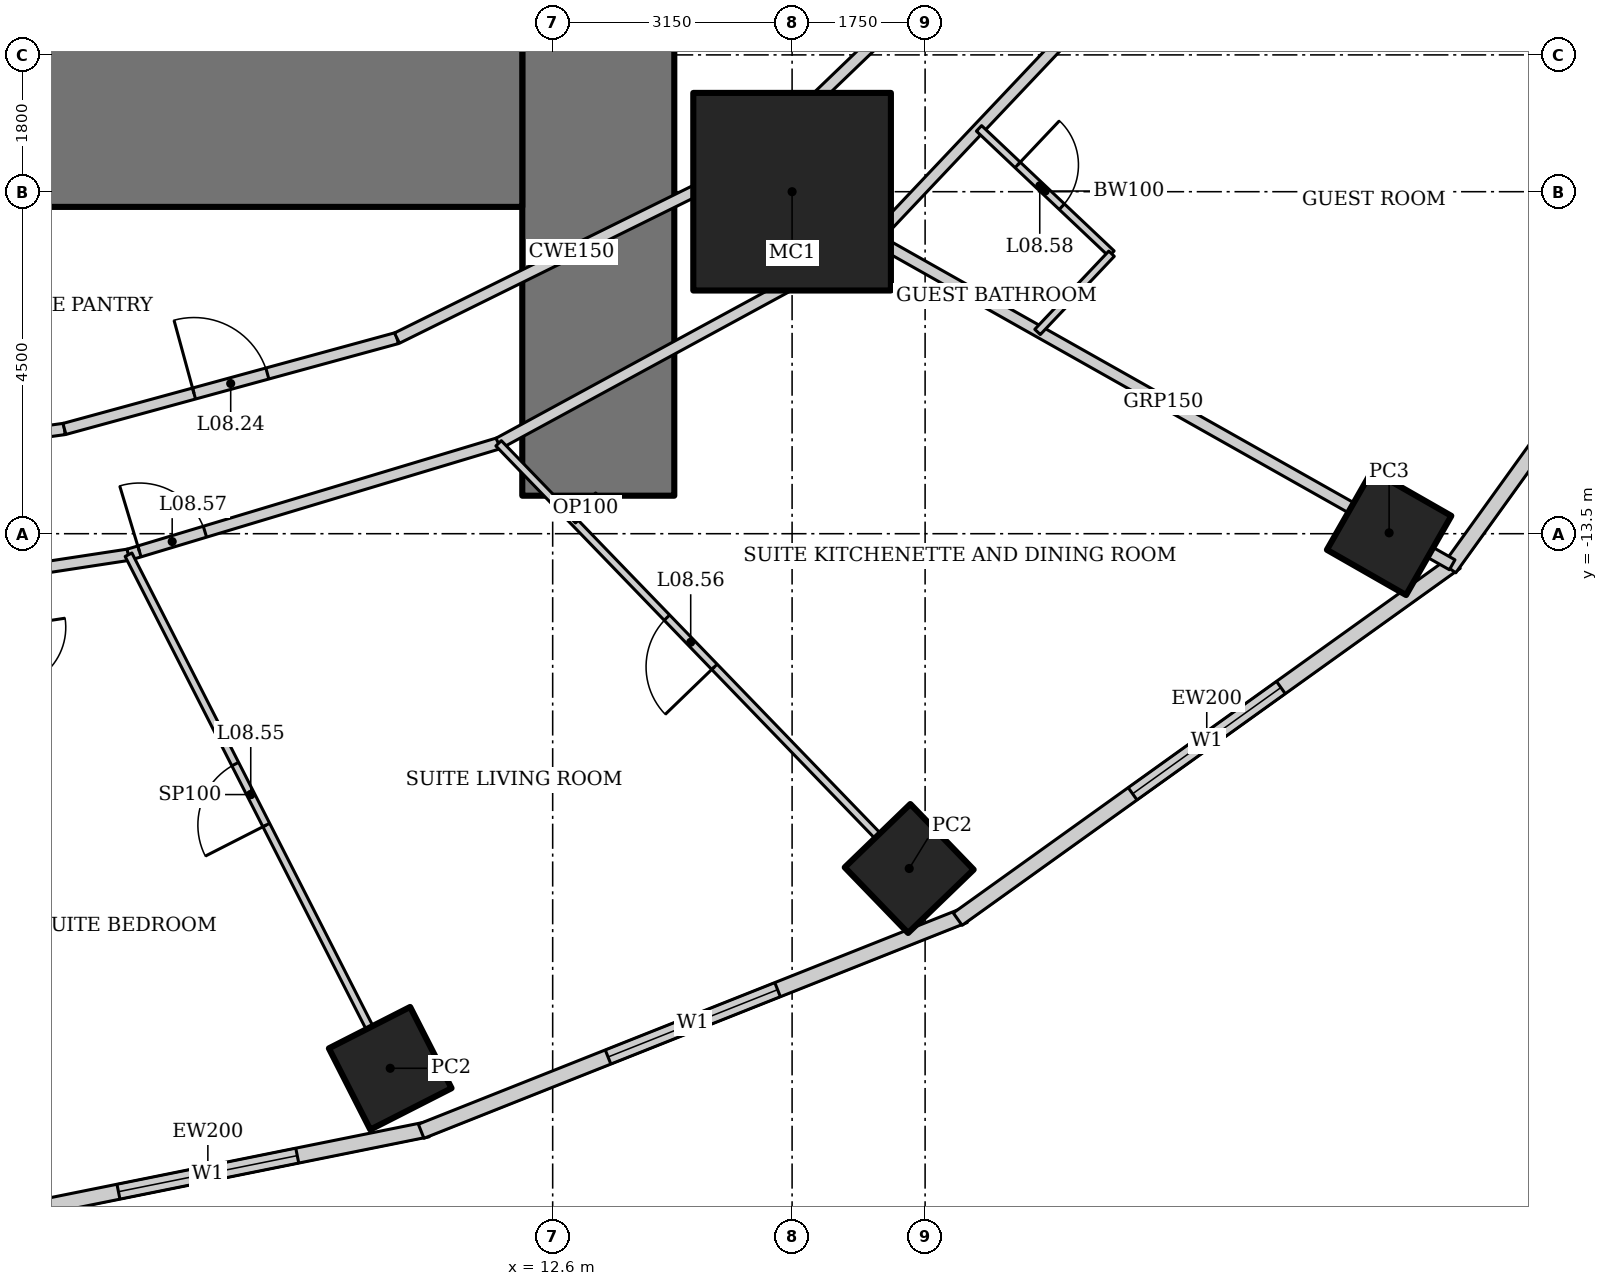
"""IFC4 building model, lengths in metres.
Left out: names, types, materials, properties, quantities, classifications, styles, units other than length and angle.
Written with IfcOpenShell. Run it as: python <this file> out.ifc"""

import sys

from ifc_helpers import new_model, si_unit, direction, frame, frame_2d, origin, origin_2d, place, context, subcontext, project, spatial, rectangle, hollow_rectangle, extrude, element, fill, save


model = new_model("IFC4")
c1 = context("Model", 3, precision=1e-05, world=origin(), true_north=direction((0.0, 1.0)))
c2 = subcontext(c1, "Body", "Model", "MODEL_VIEW")
j1 = project(units=[si_unit("LENGTHUNIT", "METRE"), si_unit("PLANEANGLEUNIT", "RADIAN")], contexts=[c1])
p1 = place(None, origin())
s1 = spatial("IfcSite", under=j1, at=p1, CompositionType="ELEMENT")
p2 = place(p1, origin())
s2 = spatial("IfcBuilding", under=s1, at=p2, CompositionType="ELEMENT")
p3 = place(p2, frame((0.0, 0.0, 44.2)))
s3 = spatial("IfcBuildingStorey", under=s2, at=p3, CompositionType="ELEMENT", Elevation=44.2)
p4 = place(p3, frame((15.75, -9.0, 0.0), z_axis=(0.0, 0.0, 1.0), x_axis=(1.0, 0.0, 0.0)))
e1 = element("IfcColumn", 1, at=p4, inside=s3, PredefinedType="COLUMN", context=c2, shape_type="SweptSolid", body=[
    extrude(hollow_rectangle(XDim=2.6, YDim=2.6, WallThickness=0.13, at=origin_2d()), origin(), (0.0, 0.0, 1.0), 3.6),
])
for number, where, z_axis, x_axis in (
    (2, (10.463, -20.534, 0.0), (0.0, 0.0, 1.0), (0.891, 0.454, 0.0)),
    (3, (17.291, -17.905, 0.0), (0.0, 0.0, 1.0), (0.719, 0.695, 0.0)),
):
    element("IfcColumn", number, at=place(p3, frame(where, z_axis=z_axis, x_axis=x_axis)), inside=s3, PredefinedType="COLUMN", context=c2, shape_type="SweptSolid", body=[
        extrude(hollow_rectangle(XDim=1.2, YDim=1.2, WallThickness=0.1, at=origin_2d()), origin(), (0.0, 0.0, 1.0), 3.6),
    ])
p5 = place(p3, frame((23.605, -13.489, 0.0), z_axis=(0.0, 0.0, 1.0), x_axis=(0.496139221777, 0.86824298017, 0.0)))
e4 = element("IfcColumn", 4, at=p5, inside=s3, PredefinedType="COLUMN", context=c2, shape_type="SweptSolid", body=[
    extrude(hollow_rectangle(XDim=1.2, YDim=1.2, WallThickness=0.12, at=origin_2d()), origin(), (0.0, 0.0, 1.0), 3.6),
])
p6 = place(p3, frame((13.2, -13.0, 0.0), z_axis=(0.0, 0.0, 1.0), x_axis=(0.0, 1.0, 0.0)))
e5 = element("IfcWall", 5, at=p6, inside=s3, PredefinedType="SHEAR", context=c2, shape_type="SweptSolid", body=[
    extrude(rectangle(XDim=26.0, YDim=2.0, at=frame_2d((13.0, 0.0))), origin(), (0.0, 0.0, 1.0), 3.6),
])
p7 = place(p6, frame((12.1, 0.0, 0.0)))
e6 = element("IfcOpeningElement", 6, at=p7, cuts=e5, PredefinedType="OPENING", context=c2, shape_type="SweptSolid", body=[
    extrude(rectangle(XDim=1.8, YDim=2.1, at=frame_2d((0.9, 1.05))), frame((0.0, 1.01, 0.0), z_axis=(0.0, -1.0, 0.0), x_axis=(1.0, 0.0, 0.0)), (0.0, 0.0, 1.0), 2.02),
])
p8 = place(p3, frame((-12.2, -8.0, 0.0), z_axis=(0.0, 0.0, 1.0), x_axis=(1.0, 0.0, 0.0)))
e7 = element("IfcWall", 7, at=p8, inside=s3, PredefinedType="SHEAR", context=c2, shape_type="SweptSolid", body=[
    extrude(rectangle(XDim=24.4, YDim=2.4, at=frame_2d((12.2, 0.0))), origin(), (0.0, 0.0, 1.0), 3.6),
])
p9 = place(p3, frame((5.17, -22.504, 0.0), z_axis=(0.0, 0.0, 1.0), x_axis=(0.980251657452, 0.197754110105, 0.0)))
e8 = element("IfcWall", 8, at=p9, inside=s3, PredefinedType="SOLIDWALL", context=c2, shape_type="SweptSolid", body=[
    extrude(rectangle(XDim=5.904, YDim=0.2, at=frame_2d((2.952, 0.0))), origin(), (0.0, 0.0, 1.0), 3.45),
])
p10 = place(p9, frame((1.752, 0.0, 0.5)))
e9 = element("IfcOpeningElement", 9, at=p10, cuts=e8, PredefinedType="OPENING", context=c2, shape_type="SweptSolid", body=[
    extrude(rectangle(XDim=2.4, YDim=2.2, at=frame_2d((1.2, 1.1))), frame((0.0, 0.11, 0.0), z_axis=(0.0, -1.0, 0.0), x_axis=(1.0, 0.0, 0.0)), (0.0, 0.0, 1.0), 0.22),
])
p11 = place(p3, frame((10.869, -21.363, 0.0), z_axis=(0.0, 0.0, 1.0), x_axis=(0.929358351251, 0.369178892895, 0.0)))
e10 = element("IfcWall", 10, at=p11, inside=s3, PredefinedType="SOLIDWALL", context=c2, shape_type="SweptSolid", body=[
    extrude(rectangle(XDim=7.692, YDim=0.2, at=frame_2d((3.846, 0.0))), origin(), (0.0, 0.0, 1.0), 3.45),
])
p12 = place(p11, frame((2.646, 0.0, 0.5)))
e11 = element("IfcOpeningElement", 11, at=p12, cuts=e10, PredefinedType="OPENING", context=c2, shape_type="SweptSolid", body=[
    extrude(rectangle(XDim=2.4, YDim=2.2, at=frame_2d((1.2, 1.1))), frame((0.0, 0.11, 0.0), z_axis=(0.0, -1.0, 0.0), x_axis=(1.0, 0.0, 0.0)), (0.0, 0.0, 1.0), 0.22),
])
p13 = place(p3, frame((17.929, -18.572, 0.0), z_axis=(0.0, 0.0, 1.0), x_axis=(0.812791321576, 0.582554948112, 0.0)))
e12 = element("IfcWall", 12, at=p13, inside=s3, PredefinedType="SOLIDWALL", context=c2, shape_type="SweptSolid", body=[
    extrude(rectangle(XDim=8.063, YDim=0.2, at=frame_2d((4.032, 0.0))), origin(), (0.0, 0.0, 1.0), 3.45),
])
p14 = place(p13, frame((2.832, 0.0, 0.5)))
e13 = element("IfcOpeningElement", 13, at=p14, cuts=e12, PredefinedType="OPENING", context=c2, shape_type="SweptSolid", body=[
    extrude(rectangle(XDim=2.4, YDim=2.2, at=frame_2d((1.2, 1.1))), frame((0.0, 0.11, 0.0), z_axis=(0.0, -1.0, 0.0), x_axis=(1.0, 0.0, 0.0)), (0.0, 0.0, 1.0), 0.22),
])
p15 = place(p3, frame((24.4, -13.957, 0.0), z_axis=(0.0, 0.0, 1.0), x_axis=(0.583937613703, 0.811798536155, 0.0)))
e14 = element("IfcWall", 14, at=p15, inside=s3, PredefinedType="SOLIDWALL", context=c2, shape_type="SweptSolid", body=[
    extrude(rectangle(XDim=8.323, YDim=0.2, at=frame_2d((4.162, 0.0))), origin(), (0.0, 0.0, 1.0), 3.45),
])
p16 = place(p15, frame((2.961, 0.0, 0.5)))
e15 = element("IfcOpeningElement", 15, at=p16, cuts=e14, PredefinedType="OPENING", context=c2, shape_type="SweptSolid", body=[
    extrude(rectangle(XDim=2.4, YDim=2.2, at=frame_2d((1.2, 1.1))), frame((0.0, 0.11, 0.0), z_axis=(0.0, -1.0, 0.0), x_axis=(1.0, 0.0, 0.0)), (0.0, 0.0, 1.0), 0.22),
])
p17 = place(p3, frame((24.435, -13.909, 0.0), z_axis=(0.0, 0.0, 1.0), x_axis=(-0.87090601027, 0.491449612143, 0.0)))
e16 = element("IfcWall", 16, at=p17, inside=s3, PredefinedType="PARTITIONING", context=c2, shape_type="SweptSolid", body=[
    extrude(rectangle(XDim=8.726, YDim=0.15, at=frame_2d((4.363, 0.0))), origin(), (0.0, 0.0, 1.0), 2.693),
])
p18 = place(p3, frame((29.222, -7.254, 0.0), z_axis=(0.0, 0.0, 1.0), x_axis=(-0.971178166182, 0.238354713676, 0.0)))
e17 = element("IfcWall", 17, at=p18, inside=s3, PredefinedType="PARTITIONING", context=c2, shape_type="SweptSolid", body=[
    extrude(rectangle(XDim=8.482, YDim=0.15, at=frame_2d((4.241, 0.0))), origin(), (0.0, 0.0, 1.0), 2.333),
])
p19 = place(p3, frame((3.311, -14.342, 0.0), z_axis=(0.0, 0.0, 1.0), x_axis=(0.988564270062, 0.150800145746, 0.0)))
e18 = element("IfcWall", 18, at=p19, inside=s3, PredefinedType="PARTITIONING", context=c2, shape_type="SweptSolid", body=[
    extrude(rectangle(XDim=3.751, YDim=0.15, at=frame_2d((1.875, 0.0))), origin(), (0.0, 0.0, 1.0), 3.45),
])
p20 = place(p3, frame((7.019, -13.776, 0.0), z_axis=(0.0, 0.0, 1.0), x_axis=(0.957564241242, 0.288219922793, 0.0)))
e19 = element("IfcWall", 19, at=p20, inside=s3, PredefinedType="PARTITIONING", context=c2, shape_type="SweptSolid", body=[
    extrude(rectangle(XDim=5.085, YDim=0.15, at=frame_2d((2.542, 0.0))), origin(), (0.0, 0.0, 1.0), 3.45),
])
p21 = place(p20, frame((0.15, 0.0, 0.0)))
e20 = element("IfcOpeningElement", 20, at=p21, cuts=e19, PredefinedType="OPENING", context=c2, shape_type="SweptSolid", body=[
    extrude(rectangle(XDim=0.9, YDim=2.1, at=frame_2d((0.45, 1.05))), frame((0.0, 0.085, 0.0), z_axis=(0.0, -1.0, 0.0), x_axis=(1.0, 0.0, 0.0)), (0.0, 0.0, 1.0), 0.17),
])
p22 = place(p3, frame((11.888, -12.311, 0.0), z_axis=(0.0, 0.0, 1.0), x_axis=(0.878450059298, 0.477834169267, 0.0)))
e21 = element("IfcWall", 21, at=p22, inside=s3, PredefinedType="PARTITIONING", context=c2, shape_type="SweptSolid", body=[
    extrude(rectangle(XDim=5.631, YDim=0.15, at=frame_2d((2.815, 0.0))), origin(), (0.0, 0.0, 1.0), 3.45),
])
p23 = place(p3, frame((16.835, -9.62, 0.0), z_axis=(0.0, 0.0, 1.0), x_axis=(0.687062608696, 0.726598218916, 0.0)))
e22 = element("IfcWall", 22, at=p23, inside=s3, PredefinedType="PARTITIONING", context=c2, shape_type="SweptSolid", body=[
    extrude(rectangle(XDim=6.039, YDim=0.15, at=frame_2d((3.02, 0.0))), origin(), (0.0, 0.0, 1.0), 3.45),
])
p24 = place(p23, frame((4.989, 0.0, 0.0)))
e23 = element("IfcOpeningElement", 23, at=p24, cuts=e22, PredefinedType="OPENING", context=c2, shape_type="SweptSolid", body=[
    extrude(rectangle(XDim=0.9, YDim=2.1, at=frame_2d((0.45, 1.05))), frame((0.0, 0.085, 0.0), z_axis=(0.0, -1.0, 0.0), x_axis=(1.0, 0.0, 0.0)), (0.0, 0.0, 1.0), 0.17),
])
p25 = place(p3, frame((2.903, -12.574, 0.0), z_axis=(0.0, 0.0, 1.0), x_axis=(0.990563451353, 0.137054911782, 0.0)))
e24 = element("IfcWall", 24, at=p25, inside=s3, PredefinedType="PARTITIONING", context=c2, shape_type="SweptSolid", body=[
    extrude(rectangle(XDim=3.304, YDim=0.15, at=frame_2d((1.652, 0.0))), origin(), (0.0, 0.0, 1.0), 3.45),
])
p26 = place(p3, frame((6.176, -12.122, 0.0), z_axis=(0.0, 0.0, 1.0), x_axis=(0.964644466646, 0.263554648923, 0.0)))
e25 = element("IfcWall", 25, at=p26, inside=s3, PredefinedType="PARTITIONING", context=c2, shape_type="SweptSolid", body=[
    extrude(rectangle(XDim=4.535, YDim=0.15, at=frame_2d((2.268, 0.0))), origin(), (0.0, 0.0, 1.0), 3.45),
])
p27 = place(p26, frame((1.768, 0.0, 0.0)))
e26 = element("IfcOpeningElement", 26, at=p27, cuts=e25, PredefinedType="OPENING", context=c2, shape_type="SweptSolid", body=[
    extrude(rectangle(XDim=1.0, YDim=2.1, at=frame_2d((0.5, 1.05))), frame((0.0, 0.085, 0.0), z_axis=(0.0, -1.0, 0.0), x_axis=(1.0, 0.0, 0.0)), (0.0, 0.0, 1.0), 0.17),
])
p28 = place(p3, frame((10.551, -10.926, 0.0), z_axis=(0.0, 0.0, 1.0), x_axis=(0.89656943448, 0.442903205177, 0.0)))
e27 = element("IfcWall", 27, at=p28, inside=s3, PredefinedType="PARTITIONING", context=c2, shape_type="SweptSolid", body=[
    extrude(rectangle(XDim=5.126, YDim=0.15, at=frame_2d((2.563, 0.0))), origin(), (0.0, 0.0, 1.0), 3.45),
])
p29 = place(p3, frame((15.147, -8.656, 0.0), z_axis=(0.0, 0.0, 1.0), x_axis=(0.720837261072, 0.693104352209, 0.0)))
e28 = element("IfcWall", 28, at=p29, inside=s3, PredefinedType="PARTITIONING", context=c2, shape_type="SweptSolid", body=[
    extrude(rectangle(XDim=5.59, YDim=0.15, at=frame_2d((2.795, 0.0))), origin(), (0.0, 0.0, 1.0), 3.45),
])
p30 = place(p29, frame((2.295, 0.0, 0.0)))
e29 = element("IfcOpeningElement", 29, at=p30, cuts=e28, PredefinedType="OPENING", context=c2, shape_type="SweptSolid", body=[
    extrude(rectangle(XDim=1.0, YDim=2.1, at=frame_2d((0.5, 1.05))), frame((0.0, 0.085, 0.0), z_axis=(0.0, -1.0, 0.0), x_axis=(1.0, 0.0, 0.0)), (0.0, 0.0, 1.0), 0.17),
])
p31 = place(p3, frame((10.236, -20.088, 0.0), z_axis=(0.0, 0.0, 1.0), x_axis=(-0.454010445571, 0.890996360998, 0.0)))
e30 = element("IfcWall", 30, at=p31, inside=s3, PredefinedType="PARTITIONING", context=c2, shape_type="SweptSolid", body=[
    extrude(rectangle(XDim=7.084, YDim=0.1, at=frame_2d((3.542, 0.0))), origin(), (0.0, 0.0, 1.0), 2.528),
])
p32 = place(p31, frame((3.092, 0.0, 0.0)))
e31 = element("IfcOpeningElement", 31, at=p32, cuts=e30, PredefinedType="OPENING", context=c2, shape_type="SweptSolid", body=[
    extrude(rectangle(XDim=0.9, YDim=2.1, at=frame_2d((0.45, 1.05))), frame((0.0, 0.06, 0.0), z_axis=(0.0, -1.0, 0.0), x_axis=(1.0, 0.0, 0.0)), (0.0, 0.0, 1.0), 0.12),
])
p33 = place(p3, frame((16.944, -17.545, 0.0), z_axis=(0.0, 0.0, 1.0), x_axis=(-0.694669949151, 0.719328618746, 0.0)))
e32 = element("IfcWall", 32, at=p33, inside=s3, PredefinedType="PARTITIONING", context=c2, shape_type="SweptSolid", body=[
    extrude(rectangle(XDim=7.277, YDim=0.1, at=frame_2d((3.639, 0.0))), origin(), (0.0, 0.0, 1.0), 2.528),
])
p34 = place(p33, frame((3.189, 0.0, 0.0)))
e33 = element("IfcOpeningElement", 33, at=p34, cuts=e32, PredefinedType="OPENING", context=c2, shape_type="SweptSolid", body=[
    extrude(rectangle(XDim=0.9, YDim=2.1, at=frame_2d((0.45, 1.05))), frame((0.0, 0.06, 0.0), z_axis=(0.0, -1.0, 0.0), x_axis=(1.0, 0.0, 0.0)), (0.0, 0.0, 1.0), 0.12),
])
p35 = place(p3, frame((18.209, -8.167, 0.0), z_axis=(0.0, 0.0, 1.0), x_axis=(0.726567238928, -0.687095369885, 0.0)))
e34 = element("IfcWall", 34, at=p35, inside=s3, PredefinedType="PARTITIONING", context=c2, shape_type="SweptSolid", body=[
    extrude(rectangle(XDim=2.4, YDim=0.1, at=frame_2d((1.2, 0.0))), origin(), (0.0, 0.0, 1.0), 3.45),
])
p36 = place(p35, frame((0.7, 0.0, 0.0)))
e35 = element("IfcOpeningElement", 35, at=p36, cuts=e34, PredefinedType="OPENING", context=c2, shape_type="SweptSolid", body=[
    extrude(rectangle(XDim=0.8, YDim=2.1, at=frame_2d((0.4, 1.05))), frame((0.0, 0.06, 0.0), z_axis=(0.0, -1.0, 0.0), x_axis=(1.0, 0.0, 0.0)), (0.0, 0.0, 1.0), 0.12),
])
p37 = place(p3, frame((19.953, -9.816, 0.0), z_axis=(0.0, 0.0, 1.0), x_axis=(-0.687017997787, -0.726640399866, 0.0)))
e36 = element("IfcWall", 36, at=p37, inside=s3, PredefinedType="PARTITIONING", context=c2, shape_type="SweptSolid", body=[
    extrude(rectangle(XDim=1.417, YDim=0.1, at=frame_2d((0.708, 0.0))), origin(), (0.0, 0.0, 1.0), 3.45),
])
p38 = place(p3, frame((13.2, -13.0, 0.0), z_axis=(0.0, 0.0, 1.0), x_axis=(-0.719347134512, -0.69465077562, 0.0)))
e37 = element("IfcWall", 37, at=p38, inside=s3, PredefinedType="PARTITIONING", context=c2, shape_type="SweptSolid", body=[
    extrude(rectangle(XDim=0.465, YDim=0.1, at=frame_2d((0.232, 0.0))), origin(), (0.0, 0.0, 1.0), 3.45),
])
p39 = place(p10, origin())
e38 = element("IfcWindow", 38, at=p39, inside=s3, PartitioningType="SINGLE_PANEL", PredefinedType="WINDOW", context=c2, shape_type="SweptSolid", body=[
    extrude(rectangle(XDim=2.4, YDim=2.2, at=frame_2d((1.2, 1.1))), frame((0.0, 0.03, 0.0), z_axis=(0.0, -1.0, 0.0), x_axis=(1.0, 0.0, 0.0)), (0.0, 0.0, 1.0), 0.06),
])
fill(e9, e38)
p40 = place(p12, origin())
e39 = element("IfcWindow", 39, at=p40, inside=s3, PartitioningType="SINGLE_PANEL", PredefinedType="WINDOW", context=c2, shape_type="SweptSolid", body=[
    extrude(rectangle(XDim=2.4, YDim=2.2, at=frame_2d((1.2, 1.1))), frame((0.0, 0.03, 0.0), z_axis=(0.0, -1.0, 0.0), x_axis=(1.0, 0.0, 0.0)), (0.0, 0.0, 1.0), 0.06),
])
fill(e11, e39)
p41 = place(p14, origin())
e40 = element("IfcWindow", 40, at=p41, inside=s3, PartitioningType="SINGLE_PANEL", PredefinedType="WINDOW", context=c2, shape_type="SweptSolid", body=[
    extrude(rectangle(XDim=2.4, YDim=2.2, at=frame_2d((1.2, 1.1))), frame((0.0, 0.03, 0.0), z_axis=(0.0, -1.0, 0.0), x_axis=(1.0, 0.0, 0.0)), (0.0, 0.0, 1.0), 0.06),
])
fill(e13, e40)
p42 = place(p27, origin())
e41 = element("IfcDoor", 41, at=p42, inside=s3, OperationType="SINGLE_SWING_LEFT", PredefinedType="DOOR", context=c2, shape_type="SweptSolid", body=[
    extrude(rectangle(XDim=1.0, YDim=2.1, at=frame_2d((0.5, 1.05))), frame((0.0, 0.025, 0.0), z_axis=(0.0, -1.0, 0.0), x_axis=(1.0, 0.0, 0.0)), (0.0, 0.0, 1.0), 0.05),
])
fill(e26, e41)
p43 = place(p32, origin())
e42 = element("IfcDoor", 42, at=p43, inside=s3, OperationType="SINGLE_SWING_LEFT", PredefinedType="DOOR", context=c2, shape_type="SweptSolid", body=[
    extrude(rectangle(XDim=0.9, YDim=2.1, at=frame_2d((0.45, 1.05))), frame((0.0, 0.025, 0.0), z_axis=(0.0, -1.0, 0.0), x_axis=(1.0, 0.0, 0.0)), (0.0, 0.0, 1.0), 0.05),
])
fill(e31, e42)
p44 = place(p34, origin())
e43 = element("IfcDoor", 43, at=p44, inside=s3, OperationType="SINGLE_SWING_LEFT", PredefinedType="DOOR", context=c2, shape_type="SweptSolid", body=[
    extrude(rectangle(XDim=0.9, YDim=2.1, at=frame_2d((0.45, 1.05))), frame((0.0, 0.025, 0.0), z_axis=(0.0, -1.0, 0.0), x_axis=(1.0, 0.0, 0.0)), (0.0, 0.0, 1.0), 0.05),
])
fill(e33, e43)
p45 = place(p21, origin())
e44 = element("IfcDoor", 44, at=p45, inside=s3, OperationType="SINGLE_SWING_LEFT", PredefinedType="DOOR", context=c2, shape_type="SweptSolid", body=[
    extrude(rectangle(XDim=0.9, YDim=2.1, at=frame_2d((0.45, 1.05))), frame((0.0, 0.025, 0.0), z_axis=(0.0, -1.0, 0.0), x_axis=(1.0, 0.0, 0.0)), (0.0, 0.0, 1.0), 0.05),
])
fill(e20, e44)
p46 = place(p36, origin())
e45 = element("IfcDoor", 45, at=p46, inside=s3, OperationType="SINGLE_SWING_LEFT", PredefinedType="DOOR", context=c2, shape_type="SweptSolid", body=[
    extrude(rectangle(XDim=0.8, YDim=2.1, at=frame_2d((0.4, 1.05))), frame((0.0, 0.025, 0.0), z_axis=(0.0, -1.0, 0.0), x_axis=(1.0, 0.0, 0.0)), (0.0, 0.0, 1.0), 0.05),
])
fill(e35, e45)
save(model, sys.argv[1])
